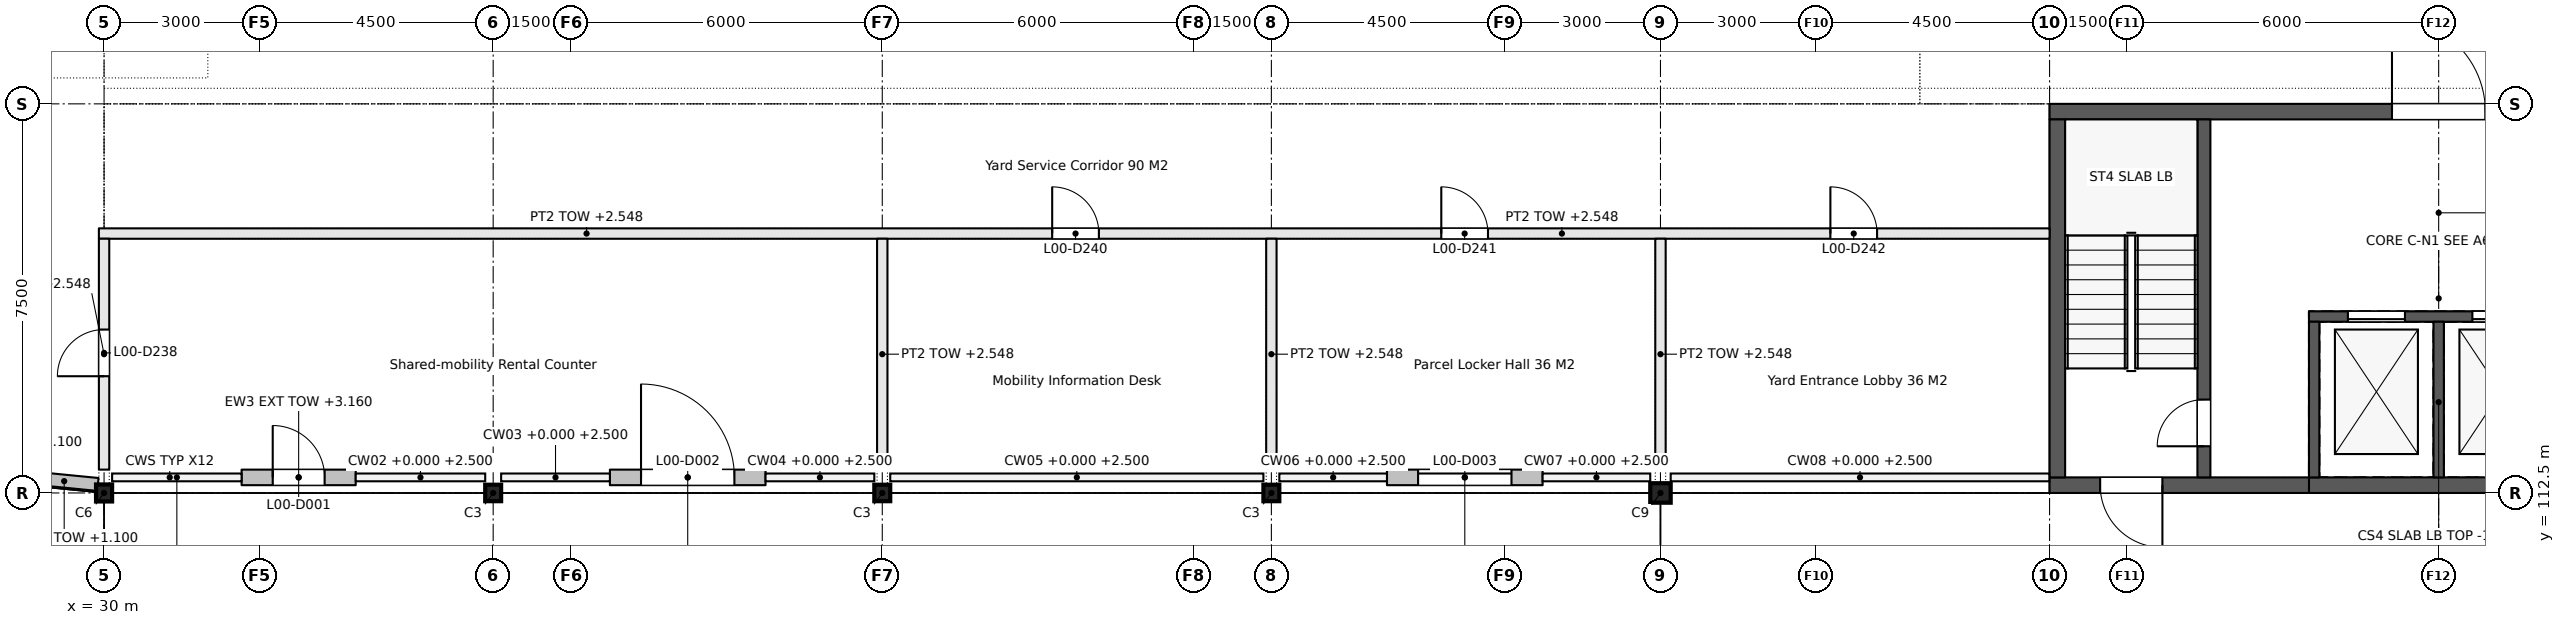
"""IFC4 building model, lengths in metres.
Left out: names, types, materials, properties, quantities, classifications, styles, units other than length and angle.
Written with IfcOpenShell. Run it as: python <this file> out.ifc"""

import sys

from ifc_helpers import new_model, si_unit, direction, frame, frame_2d, origin, origin_2d, place, context, subcontext, project, spatial, rectangle, i_section, extrude, element, fill, save


model = new_model("IFC4")
c1 = context("Model", 3, precision=1e-05, world=origin(), true_north=direction((0.0, 1.0)))
c2 = subcontext(c1, "Body", "Model", "MODEL_VIEW")
j1 = project(units=[si_unit("LENGTHUNIT", "METRE"), si_unit("PLANEANGLEUNIT", "RADIAN")], contexts=[c1])
p1 = place(None, origin())
s1 = spatial("IfcSite", under=j1, at=p1, CompositionType="ELEMENT")
p2 = place(p1, origin())
s2 = spatial("IfcBuilding", under=s1, at=p2, CompositionType="ELEMENT")
p3 = place(p2, origin())
s3 = spatial("IfcBuildingStorey", under=s2, at=p3, CompositionType="ELEMENT", Elevation=0.0)
p4 = place(p3, frame((30.0, 112.5, -0.25), z_axis=(0.0, 0.0, 1.0), x_axis=(1.0, 0.0, 0.0)))
e1 = element("IfcColumn", 1, at=p4, inside=s3, PredefinedType="COLUMN", context=c2, shape_type="SweptSolid", body=[
    extrude(i_section(OverallWidth=0.31, OverallDepth=0.328, WebThickness=0.015, FlangeThickness=0.025, FilletRadius=0.015, at=origin_2d()), origin(), (0.0, 0.0, 1.0), 3.55),
])
for number, where, z_axis, x_axis in (
    (2, (37.5, 112.5, -0.25), (0.0, 0.0, 1.0), (1.0, 0.0, 0.0)),
    (3, (45.0, 112.5, -0.25), (0.0, 0.0, 1.0), (1.0, 0.0, 0.0)),
    (4, (52.5, 112.5, -0.25), (0.0, 0.0, 1.0), (1.0, 0.0, 0.0)),
):
    element("IfcColumn", number, at=place(p3, frame(where, z_axis=z_axis, x_axis=x_axis)), inside=s3, PredefinedType="COLUMN", context=c2, shape_type="SweptSolid", body=[
        extrude(i_section(OverallWidth=0.307, OverallDepth=0.318, WebThickness=0.013, FlangeThickness=0.021, FilletRadius=0.015, at=origin_2d()), origin(), (0.0, 0.0, 1.0), 3.55),
    ])
p5 = place(p3, frame((60.0, 112.5, -0.25), z_axis=(0.0, 0.0, 1.0), x_axis=(1.0, 0.0, 0.0)))
e5 = element("IfcColumn", 5, at=p5, inside=s3, PredefinedType="COLUMN", context=c2, shape_type="SweptSolid", body=[
    extrude(i_section(OverallWidth=0.394, OverallDepth=0.376, WebThickness=0.017, FlangeThickness=0.028, FilletRadius=0.015, at=origin_2d()), origin(), (0.0, 0.0, 1.0), 3.55),
])
p6 = place(p3, frame((29.9, 117.5, 0.0), z_axis=(0.0, 0.0, 1.0), x_axis=(1.0, 0.0, 0.0)))
e6 = element("IfcWall", 6, at=p6, inside=s3, PredefinedType="PARTITIONING", context=c2, shape_type="SweptSolid", body=[
    extrude(rectangle(XDim=37.6, YDim=0.2, at=frame_2d((18.8, 0.0))), origin(), (0.0, 0.0, 1.0), 2.548),
])
p7 = place(p6, frame((18.375, 0.0, 0.0)))
e7 = element("IfcOpeningElement", 7, at=p7, cuts=e6, PredefinedType="OPENING", context=c2, shape_type="SweptSolid", body=[
    extrude(rectangle(XDim=0.9, YDim=2.1, at=frame_2d((0.45, 1.05))), frame((0.0, 0.11, 0.0), z_axis=(0.0, -1.0, 0.0), x_axis=(1.0, 0.0, 0.0)), (0.0, 0.0, 1.0), 0.22),
])
p8 = place(p6, frame((25.875, 0.0, 0.0)))
e8 = element("IfcOpeningElement", 8, at=p8, cuts=e6, PredefinedType="OPENING", context=c2, shape_type="SweptSolid", body=[
    extrude(rectangle(XDim=0.9, YDim=2.1, at=frame_2d((0.45, 1.05))), frame((0.0, 0.11, 0.0), z_axis=(0.0, -1.0, 0.0), x_axis=(1.0, 0.0, 0.0)), (0.0, 0.0, 1.0), 0.22),
])
p9 = place(p6, frame((33.375, 0.0, 0.0)))
e9 = element("IfcOpeningElement", 9, at=p9, cuts=e6, PredefinedType="OPENING", context=c2, shape_type="SweptSolid", body=[
    extrude(rectangle(XDim=0.9, YDim=2.1, at=frame_2d((0.45, 1.05))), frame((0.0, 0.11, 0.0), z_axis=(0.0, -1.0, 0.0), x_axis=(1.0, 0.0, 0.0)), (0.0, 0.0, 1.0), 0.22),
])
p10 = place(p3, frame((30.0, 112.95, 0.0), z_axis=(0.0, 0.0, 1.0), x_axis=(0.0, 1.0, 0.0)))
e10 = element("IfcWall", 10, at=p10, inside=s3, PredefinedType="PARTITIONING", context=c2, shape_type="SweptSolid", body=[
    extrude(rectangle(XDim=4.45, YDim=0.2, at=frame_2d((2.225, 0.0))), origin(), (0.0, 0.0, 1.0), 2.548),
])
p11 = place(p10, frame((1.8, 0.0, 0.0)))
e11 = element("IfcOpeningElement", 11, at=p11, cuts=e10, PredefinedType="OPENING", context=c2, shape_type="SweptSolid", body=[
    extrude(rectangle(XDim=0.9, YDim=2.1, at=frame_2d((0.45, 1.05))), frame((0.0, 0.11, 0.0), z_axis=(0.0, -1.0, 0.0), x_axis=(1.0, 0.0, 0.0)), (0.0, 0.0, 1.0), 0.22),
])
for number, where, z_axis, x_axis in (
    (12, (45.0, 112.95, 0.0), (0.0, 0.0, 1.0), (0.0, 1.0, 0.0)),
    (13, (52.5, 112.95, 0.0), (0.0, 0.0, 1.0), (0.0, 1.0, 0.0)),
    (14, (60.0, 112.95, 0.0), (0.0, 0.0, 1.0), (0.0, 1.0, 0.0)),
):
    element("IfcWall", number, at=place(p3, frame(where, z_axis=z_axis, x_axis=x_axis)), inside=s3, PredefinedType="PARTITIONING", context=c2, shape_type="SweptSolid", body=[
        extrude(rectangle(XDim=4.45, YDim=0.2, at=frame_2d((2.225, 0.0))), origin(), (0.0, 0.0, 1.0), 2.548),
    ])
p12 = place(p3, frame((32.651, 112.8, 0.0), z_axis=(0.0, 0.0, 1.0), x_axis=(1.0, 0.0, 0.0)))
e15 = element("IfcWall", 15, at=p12, inside=s3, PredefinedType="SOLIDWALL", context=c2, shape_type="SweptSolid", body=[
    extrude(rectangle(XDim=2.2, YDim=0.3, at=frame_2d((1.1, 0.0))), origin(), (0.0, 0.0, 1.0), 3.16),
])
p13 = place(p12, frame((0.6, 0.0, 0.0)))
e16 = element("IfcOpeningElement", 16, at=p13, cuts=e15, PredefinedType="OPENING", context=c2, shape_type="SweptSolid", body=[
    extrude(rectangle(XDim=1.0, YDim=2.1, at=frame_2d((0.5, 1.05))), frame((0.0, 0.16, 0.0), z_axis=(0.0, -1.0, 0.0), x_axis=(1.0, 0.0, 0.0)), (0.0, 0.0, 1.0), 0.32),
])
p14 = place(p3, frame((39.75, 112.8, 0.0), z_axis=(0.0, 0.0, 1.0), x_axis=(1.0, 0.0, 0.0)))
e17 = element("IfcWall", 17, at=p14, inside=s3, PredefinedType="SOLIDWALL", context=c2, shape_type="SweptSolid", body=[
    extrude(rectangle(XDim=3.0, YDim=0.3, at=frame_2d((1.5, 0.0))), origin(), (0.0, 0.0, 1.0), 3.16),
])
p15 = place(p14, frame((0.6, 0.0, 0.0)))
e18 = element("IfcOpeningElement", 18, at=p15, cuts=e17, PredefinedType="OPENING", context=c2, shape_type="SweptSolid", body=[
    extrude(rectangle(XDim=1.8, YDim=2.4, at=frame_2d((0.9, 1.2))), frame((0.0, 0.16, 0.0), z_axis=(0.0, -1.0, 0.0), x_axis=(1.0, 0.0, 0.0)), (0.0, 0.0, 1.0), 0.32),
])
p16 = place(p3, frame((54.728, 112.8, 0.0), z_axis=(0.0, 0.0, 1.0), x_axis=(1.0, 0.0, 0.0)))
e19 = element("IfcWall", 19, at=p16, inside=s3, PredefinedType="SOLIDWALL", context=c2, shape_type="SweptSolid", body=[
    extrude(rectangle(XDim=3.0, YDim=0.3, at=frame_2d((1.5, 0.0))), origin(), (0.0, 0.0, 1.0), 3.16),
])
p17 = place(p16, frame((0.6, 0.0, 0.0)))
e20 = element("IfcOpeningElement", 20, at=p17, cuts=e19, PredefinedType="OPENING", context=c2, shape_type="SweptSolid", body=[
    extrude(rectangle(XDim=1.8, YDim=2.4, at=frame_2d((0.9, 1.2))), frame((0.0, 0.16, 0.0), z_axis=(0.0, -1.0, 0.0), x_axis=(1.0, 0.0, 0.0)), (0.0, 0.0, 1.0), 0.32),
])
p18 = place(p3, frame((28.582, 112.792, 0.0), z_axis=(0.0, 0.0, 1.0), x_axis=(0.995171399928, -0.098152354868, 0.0)))
e21 = element("IfcWall", 21, at=p18, inside=s3, PredefinedType="SOLIDWALL", context=c2, shape_type="SweptSolid", body=[
    extrude(rectangle(XDim=1.306, YDim=0.25, at=frame_2d((0.653, 0.0))), origin(), (0.0, 0.0, 1.0), 1.1),
])
p19 = place(p3, frame((67.5, 119.85, 0.0), z_axis=(0.0, 0.0, 1.0), x_axis=(1.0, 0.0, 0.0)))
e22 = element("IfcWall", 22, at=p19, inside=s3, PredefinedType="SHEAR", context=c2, shape_type="SweptSolid", body=[
    extrude(rectangle(XDim=15.0, YDim=0.3, at=frame_2d((7.5, 0.0))), origin(), (0.0, 0.0, 1.0), 3.3),
])
p20 = place(p19, frame((6.6, 0.0, 0.0)))
e23 = element("IfcOpeningElement", 23, at=p20, cuts=e22, PredefinedType="OPENING", context=c2, shape_type="SweptSolid", body=[
    extrude(rectangle(XDim=1.8, YDim=2.1, at=frame_2d((0.9, 1.05))), frame((0.0, 0.16, 0.0), z_axis=(0.0, -1.0, 0.0), x_axis=(1.0, 0.0, 0.0)), (0.0, 0.0, 1.0), 0.32),
])
p21 = place(p3, frame((77.5, 112.65, 0.0), z_axis=(0.0, 0.0, 1.0), x_axis=(-1.0, 0.0, 0.0)))
e24 = element("IfcWall", 24, at=p21, inside=s3, PredefinedType="SHEAR", context=c2, shape_type="SweptSolid", body=[
    extrude(rectangle(XDim=5.0, YDim=0.3, at=frame_2d((2.5, 0.0))), origin(), (0.0, 0.0, 1.0), 3.3),
])
p22 = place(p3, frame((72.5, 112.65, 0.0), z_axis=(0.0, 0.0, 1.0), x_axis=(-1.0, 0.0, 0.0)))
e25 = element("IfcWall", 25, at=p22, inside=s3, PredefinedType="SHEAR", context=c2, shape_type="SweptSolid", body=[
    extrude(rectangle(XDim=5.0, YDim=0.3, at=frame_2d((2.5, 0.0))), origin(), (0.0, 0.0, 1.0), 3.3),
])
p23 = place(p22, frame((2.825, 0.0, 0.0)))
e26 = element("IfcOpeningElement", 26, at=p23, cuts=e25, PredefinedType="OPENING", context=c2, shape_type="SweptSolid", body=[
    extrude(rectangle(XDim=1.2, YDim=2.1, at=frame_2d((0.6, 1.05))), frame((0.0, 0.16, 0.0), z_axis=(0.0, -1.0, 0.0), x_axis=(1.0, 0.0, 0.0)), (0.0, 0.0, 1.0), 0.32),
])
p24 = place(p3, frame((67.65, 119.7, 0.0), z_axis=(0.0, 0.0, 1.0), x_axis=(0.0, -1.0, 0.0)))
e27 = element("IfcWall", 27, at=p24, inside=s3, PredefinedType="SHEAR", context=c2, shape_type="SweptSolid", body=[
    extrude(rectangle(XDim=6.9, YDim=0.3, at=frame_2d((3.45, 0.0))), origin(), (0.0, 0.0, 1.0), 3.3),
])
p25 = place(p3, frame((70.475, 112.8, 0.0), z_axis=(0.0, 0.0, 1.0), x_axis=(0.0, 1.0, 0.0)))
e28 = element("IfcWall", 28, at=p25, inside=s3, PredefinedType="STANDARD", context=c2, shape_type="SweptSolid", body=[
    extrude(rectangle(XDim=6.9, YDim=0.25, at=frame_2d((3.45, 0.0))), origin(), (0.0, 0.0, 1.0), 3.1),
])
p26 = place(p25, frame((0.6, 0.0, 0.0)))
e29 = element("IfcOpeningElement", 29, at=p26, cuts=e28, PredefinedType="OPENING", context=c2, shape_type="SweptSolid", body=[
    extrude(rectangle(XDim=0.9, YDim=2.1, at=frame_2d((0.45, 1.05))), frame((0.0, 0.135, 0.0), z_axis=(0.0, -1.0, 0.0), x_axis=(1.0, 0.0, 0.0)), (0.0, 0.0, 1.0), 0.27),
])
p27 = place(p3, frame((77.5, 115.9, 0.0), z_axis=(0.0, 0.0, 1.0), x_axis=(-1.0, 0.0, 0.0)))
e30 = element("IfcWall", 30, at=p27, inside=s3, PredefinedType="STANDARD", context=c2, shape_type="SweptSolid", body=[
    extrude(rectangle(XDim=5.0, YDim=0.2, at=frame_2d((2.5, 0.0))), origin(), (0.0, 0.0, 1.0), 3.1),
])
p28 = place(p27, frame((0.75, 0.0, 0.0)))
e31 = element("IfcOpeningElement", 31, at=p28, cuts=e30, PredefinedType="OPENING", context=c2, shape_type="SweptSolid", body=[
    extrude(rectangle(XDim=1.1, YDim=2.1, at=frame_2d((0.55, 1.05))), frame((0.0, 0.11, 0.0), z_axis=(0.0, -1.0, 0.0), x_axis=(1.0, 0.0, 0.0)), (0.0, 0.0, 1.0), 0.22),
])
p29 = place(p27, frame((3.15, 0.0, 0.0)))
e32 = element("IfcOpeningElement", 32, at=p29, cuts=e30, PredefinedType="OPENING", context=c2, shape_type="SweptSolid", body=[
    extrude(rectangle(XDim=1.1, YDim=2.1, at=frame_2d((0.55, 1.05))), frame((0.0, 0.11, 0.0), z_axis=(0.0, -1.0, 0.0), x_axis=(1.0, 0.0, 0.0)), (0.0, 0.0, 1.0), 0.22),
])
for number, where, z_axis, x_axis in (
    (33, (75.0, 115.8, 0.0), (0.0, 0.0, 1.0), (0.0, -1.0, 0.0)),
    (34, (72.6, 115.8, 0.0), (0.0, 0.0, 1.0), (0.0, -1.0, 0.0)),
):
    element("IfcWall", number, at=place(p3, frame(where, z_axis=z_axis, x_axis=x_axis)), inside=s3, PredefinedType="STANDARD", context=c2, shape_type="SweptSolid", body=[
        extrude(rectangle(XDim=3.0, YDim=0.2, at=frame_2d((1.5, 0.0))), origin(), (0.0, 0.0, 1.0), 3.1),
    ])
p30 = place(p3, frame((77.5, 115.9, -1.5), z_axis=(0.0, 0.0, 1.0), x_axis=(-1.0, 0.0, 0.0)))
e35 = element("IfcWall", 35, at=p30, inside=s3, PredefinedType="STANDARD", context=c2, shape_type="SweptSolid", body=[
    extrude(rectangle(XDim=5.0, YDim=0.2, at=frame_2d((2.5, 0.0))), origin(), (0.0, 0.0, 1.0), 1.3),
])
for number, where, z_axis, x_axis in (
    (36, (75.0, 115.8, -1.5), (0.0, 0.0, 1.0), (0.0, -1.0, 0.0)),
    (37, (72.6, 115.8, -1.5), (0.0, 0.0, 1.0), (0.0, -1.0, 0.0)),
):
    element("IfcWall", number, at=place(p3, frame(where, z_axis=z_axis, x_axis=x_axis)), inside=s3, PredefinedType="STANDARD", context=c2, shape_type="SweptSolid", body=[
        extrude(rectangle(XDim=3.0, YDim=0.2, at=frame_2d((1.5, 0.0))), origin(), (0.0, 0.0, 1.0), 1.3),
    ])
p31 = place(p3, frame((77.5, 112.65, -1.5), z_axis=(0.0, 0.0, 1.0), x_axis=(-1.0, 0.0, 0.0)))
e38 = element("IfcWall", 38, at=p31, inside=s3, PredefinedType="SHEAR", context=c2, shape_type="SweptSolid", body=[
    extrude(rectangle(XDim=5.0, YDim=0.3, at=frame_2d((2.5, 0.0))), origin(), (0.0, 0.0, 1.0), 1.3),
])
p32 = place(p11, origin())
e39 = element("IfcDoor", 39, at=p32, inside=s3, OperationType="SINGLE_SWING_RIGHT", PredefinedType="DOOR", context=c2, shape_type="SweptSolid", body=[
    extrude(rectangle(XDim=0.9, YDim=2.1, at=frame_2d((0.45, 1.05))), frame((0.0, 0.025, 0.0), z_axis=(0.0, -1.0, 0.0), x_axis=(1.0, 0.0, 0.0)), (0.0, 0.0, 1.0), 0.05),
])
fill(e11, e39)
p33 = place(p7, origin())
e40 = element("IfcDoor", 40, at=p33, inside=s3, OperationType="SINGLE_SWING_RIGHT", PredefinedType="DOOR", context=c2, shape_type="SweptSolid", body=[
    extrude(rectangle(XDim=0.9, YDim=2.1, at=frame_2d((0.45, 1.05))), frame((0.0, 0.025, 0.0), z_axis=(0.0, -1.0, 0.0), x_axis=(1.0, 0.0, 0.0)), (0.0, 0.0, 1.0), 0.05),
])
fill(e7, e40)
p34 = place(p8, origin())
e41 = element("IfcDoor", 41, at=p34, inside=s3, OperationType="SINGLE_SWING_RIGHT", PredefinedType="DOOR", context=c2, shape_type="SweptSolid", body=[
    extrude(rectangle(XDim=0.9, YDim=2.1, at=frame_2d((0.45, 1.05))), frame((0.0, 0.025, 0.0), z_axis=(0.0, -1.0, 0.0), x_axis=(1.0, 0.0, 0.0)), (0.0, 0.0, 1.0), 0.05),
])
fill(e8, e41)
p35 = place(p9, origin())
e42 = element("IfcDoor", 42, at=p35, inside=s3, OperationType="SINGLE_SWING_RIGHT", PredefinedType="DOOR", context=c2, shape_type="SweptSolid", body=[
    extrude(rectangle(XDim=0.9, YDim=2.1, at=frame_2d((0.45, 1.05))), frame((0.0, 0.025, 0.0), z_axis=(0.0, -1.0, 0.0), x_axis=(1.0, 0.0, 0.0)), (0.0, 0.0, 1.0), 0.05),
])
fill(e9, e42)
p36 = place(p13, origin())
e43 = element("IfcDoor", 43, at=p36, inside=s3, OperationType="SINGLE_SWING_RIGHT", PredefinedType="DOOR", context=c2, shape_type="SweptSolid", body=[
    extrude(rectangle(XDim=1.0, YDim=2.1, at=frame_2d((0.5, 1.05))), frame((0.0, 0.025, 0.0), z_axis=(0.0, -1.0, 0.0), x_axis=(1.0, 0.0, 0.0)), (0.0, 0.0, 1.0), 0.05),
])
fill(e16, e43)
p37 = place(p15, origin())
e44 = element("IfcDoor", 44, at=p37, inside=s3, OperationType="DOUBLE_DOOR_DOUBLE_SWING", PredefinedType="DOOR", context=c2, shape_type="SweptSolid", body=[
    extrude(rectangle(XDim=1.8, YDim=2.4, at=frame_2d((0.9, 1.2))), frame((0.0, 0.025, 0.0), z_axis=(0.0, -1.0, 0.0), x_axis=(1.0, 0.0, 0.0)), (0.0, 0.0, 1.0), 0.05),
])
fill(e18, e44)
p38 = place(p17, origin())
e45 = element("IfcDoor", 45, at=p38, inside=s3, OperationType="DOUBLE_DOOR_SLIDING", PredefinedType="DOOR", context=c2, shape_type="SweptSolid", body=[
    extrude(rectangle(XDim=1.8, YDim=2.4, at=frame_2d((0.9, 1.2))), frame((0.0, 0.025, 0.0), z_axis=(0.0, -1.0, 0.0), x_axis=(1.0, 0.0, 0.0)), (0.0, 0.0, 1.0), 0.05),
])
fill(e20, e45)
p39 = place(p20, origin())
e46 = element("IfcDoor", 46, at=p39, inside=s3, OperationType="DOUBLE_DOOR_SINGLE_SWING", PredefinedType="DOOR", context=c2, shape_type="SweptSolid", body=[
    extrude(rectangle(XDim=1.8, YDim=2.1, at=frame_2d((0.9, 1.05))), frame((0.0, 0.025, 0.0), z_axis=(0.0, -1.0, 0.0), x_axis=(1.0, 0.0, 0.0)), (0.0, 0.0, 1.0), 0.05),
])
fill(e23, e46)
p40 = place(p26, origin())
e47 = element("IfcDoor", 47, at=p40, inside=s3, OperationType="SINGLE_SWING_RIGHT", PredefinedType="DOOR", context=c2, shape_type="SweptSolid", body=[
    extrude(rectangle(XDim=0.9, YDim=2.1, at=frame_2d((0.45, 1.05))), frame((0.0, 0.025, 0.0), z_axis=(0.0, -1.0, 0.0), x_axis=(1.0, 0.0, 0.0)), (0.0, 0.0, 1.0), 0.05),
])
fill(e29, e47)
p41 = place(p28, origin())
e48 = element("IfcDoor", 48, at=p41, inside=s3, OperationType="DOUBLE_DOOR_SLIDING", PredefinedType="DOOR", context=c2, shape_type="SweptSolid", body=[
    extrude(rectangle(XDim=1.1, YDim=2.1, at=frame_2d((0.55, 1.05))), frame((0.0, 0.025, 0.0), z_axis=(0.0, -1.0, 0.0), x_axis=(1.0, 0.0, 0.0)), (0.0, 0.0, 1.0), 0.05),
])
fill(e31, e48)
p42 = place(p29, origin())
e49 = element("IfcDoor", 49, at=p42, inside=s3, OperationType="DOUBLE_DOOR_SLIDING", PredefinedType="DOOR", context=c2, shape_type="SweptSolid", body=[
    extrude(rectangle(XDim=1.1, YDim=2.1, at=frame_2d((0.55, 1.05))), frame((0.0, 0.025, 0.0), z_axis=(0.0, -1.0, 0.0), x_axis=(1.0, 0.0, 0.0)), (0.0, 0.0, 1.0), 0.05),
])
fill(e32, e49)
p43 = place(p23, origin())
e50 = element("IfcDoor", 50, at=p43, inside=s3, OperationType="SINGLE_SWING_RIGHT", PredefinedType="DOOR", context=c2, shape_type="SweptSolid", body=[
    extrude(rectangle(XDim=1.2, YDim=2.1, at=frame_2d((0.6, 1.05))), frame((0.0, 0.025, 0.0), z_axis=(0.0, -1.0, 0.0), x_axis=(1.0, 0.0, 0.0)), (0.0, 0.0, 1.0), 0.05),
])
fill(e26, e50)
save(model, sys.argv[1])
